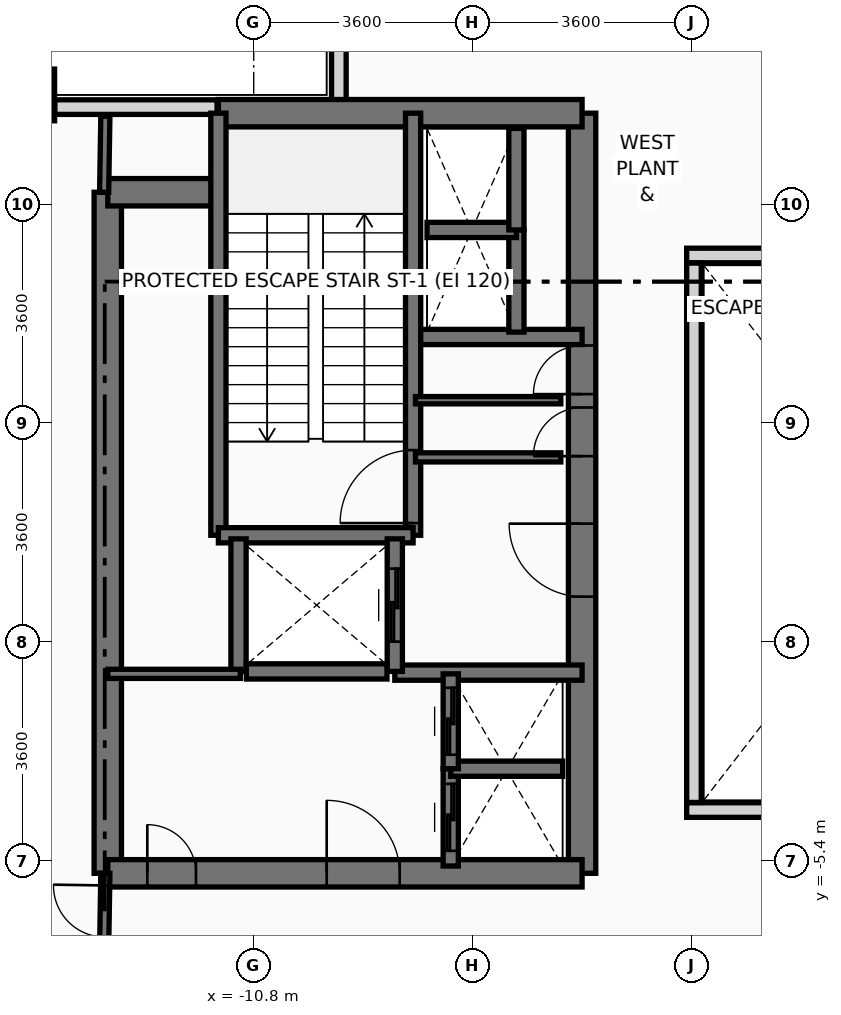
"""IFC4 building model, lengths in metres.
Left out: names, types, materials, properties, quantities, classifications, styles, units other than length and angle.
Written with IfcOpenShell. Run it as: python <this file> out.ifc"""

import sys

from ifc_helpers import new_model, si_unit, direction, frame, frame_2d, origin, origin_2d, place, context, subcontext, project, spatial, rectangle, extrude, source, transform, mapped, element, fill, save


model = new_model("IFC4")
c1 = context("Model", 3, precision=1e-05, world=origin(), true_north=direction((0.0, 1.0)))
c2 = subcontext(c1, "Body", "Model", "MODEL_VIEW")
j1 = project(units=[si_unit("LENGTHUNIT", "METRE"), si_unit("PLANEANGLEUNIT", "RADIAN")], contexts=[c1])
p1 = place(None, origin())
s1 = spatial("IfcSite", under=j1, at=p1, CompositionType="ELEMENT")
p2 = place(p1, origin())
s2 = spatial("IfcBuilding", under=s1, at=p2, CompositionType="ELEMENT")
p3 = place(p2, frame((0.0, 0.0, 151.6)))
s3 = spatial("IfcBuildingStorey", under=s2, at=p3, CompositionType="ELEMENT", Elevation=151.6)
m1 = source(origin(), c2, "Body", "SweptSolid", [
    extrude(rectangle(XDim=0.65, YDim=0.85, at=origin_2d()), origin(), (0.0, 0.0, 1.0), 4.4),
])
p4 = place(p3, frame((-14.4, 7.2, 0.0), z_axis=(0.0, 0.0, 1.0), x_axis=(1.0, 0.0, 0.0)))
e1 = element("IfcColumn", 1, at=p4, inside=s3, PredefinedType="COLUMN", context=c2, shape_type="MappedRepresentation", body=[
    mapped(m1, transform((0.0, 0.0, 0.0), x_axis=(1.0, 0.0, 0.0), y_axis=(0.0, 1.0, 0.0), z_axis=(0.0, 0.0, 1.0), scale=1.0)),
])
p5 = place(p3, frame((-14.072, 7.0, 0.0), z_axis=(0.0, 0.0, 1.0), x_axis=(1.0, 0.0, 0.0)))
e2 = element("IfcWall", 2, at=p5, inside=s3, PredefinedType="PARAPET", context=c2, shape_type="SweptSolid", body=[
    extrude(rectangle(XDim=2.669, YDim=0.24, at=frame_2d((1.334, 0.0))), origin(), (0.0, 0.0, 1.0), 1.15),
])
p6 = place(p3, frame((-9.4, 6.953, 0.0), z_axis=(0.0, 0.0, 1.0), x_axis=(0.0, 1.0, 0.0)))
e3 = element("IfcWall", 3, at=p6, inside=s3, PredefinedType="PARAPET", context=c2, shape_type="SweptSolid", body=[
    extrude(rectangle(XDim=1.519, YDim=0.24, at=frame_2d((0.76, 0.0))), origin(), (0.0, 0.0, 1.0), 1.15),
])
p7 = place(p3, frame((-13.2, -5.6, 0.0), z_axis=(0.0, 0.0, 1.0), x_axis=(0.0, 1.0, 0.0)))
e4 = element("IfcWall", 4, at=p7, inside=s3, PredefinedType="SHEAR", context=c2, shape_type="SweptSolid", body=[
    extrude(rectangle(XDim=11.2, YDim=0.45, at=frame_2d((5.6, 0.0))), origin(), (0.0, 0.0, 1.0), 4.4),
])
p8 = place(p3, frame((-5.4, -5.6, 0.0), z_axis=(0.0, 0.0, 1.0), x_axis=(0.0, 1.0, 0.0)))
e5 = element("IfcWall", 5, at=p8, inside=s3, PredefinedType="SHEAR", context=c2, shape_type="SweptSolid", body=[
    extrude(rectangle(XDim=12.5, YDim=0.45, at=frame_2d((6.25, 0.0))), origin(), (0.0, 0.0, 1.0), 4.4),
])
p9 = place(p8, frame((4.55, 0.0, 0.0)))
e6 = element("IfcOpeningElement", 6, at=p9, cuts=e5, PredefinedType="OPENING", context=c2, shape_type="SweptSolid", body=[
    extrude(rectangle(XDim=1.2, YDim=2.2, at=frame_2d((0.6, 1.1))), frame((0.0, 0.235, 0.0), z_axis=(0.0, -1.0, 0.0), x_axis=(1.0, 0.0, 0.0)), (0.0, 0.0, 1.0), 0.47),
])
p10 = place(p8, frame((6.86, 0.0, 0.0)))
e7 = element("IfcOpeningElement", 7, at=p10, cuts=e5, PredefinedType="OPENING", context=c2, shape_type="SweptSolid", body=[
    extrude(rectangle(XDim=0.8, YDim=2.1, at=frame_2d((0.4, 1.05))), frame((0.0, 0.235, 0.0), z_axis=(0.0, -1.0, 0.0), x_axis=(1.0, 0.0, 0.0)), (0.0, 0.0, 1.0), 0.47),
])
p11 = place(p8, frame((7.88, 0.0, 0.0)))
e8 = element("IfcOpeningElement", 8, at=p11, cuts=e5, PredefinedType="OPENING", context=c2, shape_type="SweptSolid", body=[
    extrude(rectangle(XDim=0.8, YDim=2.1, at=frame_2d((0.4, 1.05))), frame((0.0, 0.235, 0.0), z_axis=(0.0, -1.0, 0.0), x_axis=(1.0, 0.0, 0.0)), (0.0, 0.0, 1.0), 0.47),
])
p12 = place(p3, frame((-11.381, 6.9, 0.0), z_axis=(0.0, 0.0, 1.0), x_axis=(1.0, 0.0, 0.0)))
e9 = element("IfcWall", 9, at=p12, inside=s3, PredefinedType="SHEAR", context=c2, shape_type="SweptSolid", body=[
    extrude(rectangle(XDim=5.981, YDim=0.45, at=frame_2d((2.991, 0.0))), origin(), (0.0, 0.0, 1.0), 4.4),
])
p13 = place(p3, frame((-13.2, 5.6, 0.0), z_axis=(0.0, 0.0, 1.0), x_axis=(1.0, 0.0, 0.0)))
e10 = element("IfcWall", 10, at=p13, inside=s3, PredefinedType="SHEAR", context=c2, shape_type="SweptSolid", body=[
    extrude(rectangle(XDim=1.819, YDim=0.45, at=frame_2d((0.909, 0.0))), origin(), (0.0, 0.0, 1.0), 4.4),
])
p14 = place(p3, frame((-13.2, -5.6, 0.0), z_axis=(0.0, 0.0, 1.0), x_axis=(1.0, 0.0, 0.0)))
e11 = element("IfcWall", 11, at=p14, inside=s3, PredefinedType="SHEAR", context=c2, shape_type="SweptSolid", body=[
    extrude(rectangle(XDim=7.8, YDim=0.45, at=frame_2d((3.9, 0.0))), origin(), (0.0, 0.0, 1.0), 4.4),
])
p15 = place(p14, frame((3.6, 0.0, 0.0)))
e12 = element("IfcOpeningElement", 12, at=p15, cuts=e11, PredefinedType="OPENING", context=c2, shape_type="SweptSolid", body=[
    extrude(rectangle(XDim=1.2, YDim=2.2, at=frame_2d((0.6, 1.1))), frame((0.0, 0.235, 0.0), z_axis=(0.0, -1.0, 0.0), x_axis=(1.0, 0.0, 0.0)), (0.0, 0.0, 1.0), 0.47),
])
p16 = place(p14, frame((0.65, 0.0, 0.0)))
e13 = element("IfcOpeningElement", 13, at=p16, cuts=e11, PredefinedType="OPENING", context=c2, shape_type="SweptSolid", body=[
    extrude(rectangle(XDim=0.8, YDim=2.1, at=frame_2d((0.4, 1.05))), frame((0.0, 0.235, 0.0), z_axis=(0.0, -1.0, 0.0), x_axis=(1.0, 0.0, 0.0)), (0.0, 0.0, 1.0), 0.47),
])
p17 = place(p3, frame((-8.18, 3.22, 0.0), z_axis=(0.0, 0.0, 1.0), x_axis=(1.0, 0.0, 0.0)))
e14 = element("IfcWall", 14, at=p17, inside=s3, PredefinedType="SOLIDWALL", context=c2, shape_type="SweptSolid", body=[
    extrude(rectangle(XDim=2.78, YDim=0.25, at=frame_2d((1.39, 0.0))), origin(), (0.0, 0.0, 1.0), 4.4),
])
p18 = place(p3, frame((-8.48, -2.3, 0.0), z_axis=(0.0, 0.0, 1.0), x_axis=(1.0, 0.0, 0.0)))
e15 = element("IfcWall", 15, at=p18, inside=s3, PredefinedType="SOLIDWALL", context=c2, shape_type="SweptSolid", body=[
    extrude(rectangle(XDim=3.08, YDim=0.25, at=frame_2d((1.54, 0.0))), origin(), (0.0, 0.0, 1.0), 4.4),
])
p19 = place(p3, frame((-8.179, -0.041, 0.0), z_axis=(0.0, 0.0, 1.0), x_axis=(0.0, 1.0, 0.0)))
e16 = element("IfcWall", 16, at=p19, inside=s3, PredefinedType="SOLIDWALL", context=c2, shape_type="SweptSolid", body=[
    extrude(rectangle(XDim=6.941, YDim=0.25, at=frame_2d((3.47, 0.0))), origin(), (0.0, 0.0, 1.0), 4.4),
])
p20 = place(p19, frame((0.2, 0.0, 0.0)))
e17 = element("IfcOpeningElement", 17, at=p20, cuts=e16, PredefinedType="OPENING", context=c2, shape_type="SweptSolid", body=[
    extrude(rectangle(XDim=1.2, YDim=2.2, at=frame_2d((0.6, 1.1))), frame((0.0, 0.135, 0.0), z_axis=(0.0, -1.0, 0.0), x_axis=(1.0, 0.0, 0.0)), (0.0, 0.0, 1.0), 0.27),
])
p21 = place(p3, frame((-11.381, -0.041, 0.0), z_axis=(0.0, 0.0, 1.0), x_axis=(0.0, 1.0, 0.0)))
e18 = element("IfcWall", 18, at=p21, inside=s3, PredefinedType="SOLIDWALL", context=c2, shape_type="SweptSolid", body=[
    extrude(rectangle(XDim=6.941, YDim=0.25, at=frame_2d((3.47, 0.0))), origin(), (0.0, 0.0, 1.0), 4.4),
])
p22 = place(p3, frame((-11.381, -0.041, 0.0), z_axis=(0.0, 0.0, 1.0), x_axis=(1.0, 0.0, 0.0)))
e19 = element("IfcWall", 19, at=p22, inside=s3, PredefinedType="SOLIDWALL", context=c2, shape_type="SweptSolid", body=[
    extrude(rectangle(XDim=3.202, YDim=0.25, at=frame_2d((1.601, 0.0))), origin(), (0.0, 0.0, 1.0), 4.4),
])
p23 = place(p3, frame((-11.05, -2.28, 0.0), z_axis=(0.0, 0.0, 1.0), x_axis=(0.0, 1.0, 0.0)))
e20 = element("IfcWall", 20, at=p23, inside=s3, PredefinedType="SOLIDWALL", context=c2, shape_type="SweptSolid", body=[
    extrude(rectangle(XDim=2.18, YDim=0.25, at=frame_2d((1.09, 0.0))), origin(), (0.0, 0.0, 1.0), 4.4),
])
p24 = place(p3, frame((-8.48, -2.28, 0.0), z_axis=(0.0, 0.0, 1.0), x_axis=(0.0, 1.0, 0.0)))
e21 = element("IfcWall", 21, at=p24, inside=s3, PredefinedType="SOLIDWALL", context=c2, shape_type="SweptSolid", body=[
    extrude(rectangle(XDim=2.18, YDim=0.25, at=frame_2d((1.09, 0.0))), origin(), (0.0, 0.0, 1.0), 4.4),
])
p25 = place(p24, frame((0.49, 0.0, 0.0)))
e22 = element("IfcOpeningElement", 22, at=p25, cuts=e21, PredefinedType="OPENING", context=c2, shape_type="SweptSolid", body=[
    extrude(rectangle(XDim=1.2, YDim=2.2, at=frame_2d((0.6, 1.1))), frame((0.0, 0.135, 0.0), z_axis=(0.0, -1.0, 0.0), x_axis=(1.0, 0.0, 0.0)), (0.0, 0.0, 1.0), 0.27),
])
p26 = place(p3, frame((-10.921, -2.28, 0.0), z_axis=(0.0, 0.0, 1.0), x_axis=(1.0, 0.0, 0.0)))
e23 = element("IfcWall", 23, at=p26, inside=s3, PredefinedType="SOLIDWALL", context=c2, shape_type="SweptSolid", body=[
    extrude(rectangle(XDim=2.312, YDim=0.25, at=frame_2d((1.156, 0.0))), origin(), (0.0, 0.0, 1.0), 4.4),
])
p27 = place(p3, frame((-7.56, -5.48, 0.0), z_axis=(0.0, 0.0, 1.0), x_axis=(0.0, 1.0, 0.0)))
e24 = element("IfcWall", 24, at=p27, inside=s3, PredefinedType="SOLIDWALL", context=c2, shape_type="SweptSolid", body=[
    extrude(rectangle(XDim=1.6, YDim=0.25, at=frame_2d((0.8, 0.0))), origin(), (0.0, 0.0, 1.0), 4.4),
])
p28 = place(p27, frame((0.25, 0.0, 0.0)))
e25 = element("IfcOpeningElement", 25, at=p28, cuts=e24, PredefinedType="OPENING", context=c2, shape_type="SweptSolid", body=[
    extrude(rectangle(XDim=1.1, YDim=2.2, at=frame_2d((0.55, 1.1))), frame((0.0, 0.135, 0.0), z_axis=(0.0, -1.0, 0.0), x_axis=(1.0, 0.0, 0.0)), (0.0, 0.0, 1.0), 0.27),
])
p29 = place(p3, frame((-7.56, -3.88, 0.0), z_axis=(0.0, 0.0, 1.0), x_axis=(1.0, 0.0, 0.0)))
e26 = element("IfcWall", 26, at=p29, inside=s3, PredefinedType="SOLIDWALL", context=c2, shape_type="SweptSolid", body=[
    extrude(rectangle(XDim=1.84, YDim=0.25, at=frame_2d((0.92, 0.0))), origin(), (0.0, 0.0, 1.0), 4.4),
])
p30 = place(p3, frame((-7.56, -3.88, 0.0), z_axis=(0.0, 0.0, 1.0), x_axis=(0.0, 1.0, 0.0)))
e27 = element("IfcWall", 27, at=p30, inside=s3, PredefinedType="SOLIDWALL", context=c2, shape_type="SweptSolid", body=[
    extrude(rectangle(XDim=1.56, YDim=0.25, at=frame_2d((0.78, 0.0))), origin(), (0.0, 0.0, 1.0), 4.4),
])
p31 = place(p30, frame((0.23, 0.0, 0.0)))
e28 = element("IfcOpeningElement", 28, at=p31, cuts=e27, PredefinedType="OPENING", context=c2, shape_type="SweptSolid", body=[
    extrude(rectangle(XDim=1.1, YDim=2.2, at=frame_2d((0.55, 1.1))), frame((0.0, 0.135, 0.0), z_axis=(0.0, -1.0, 0.0), x_axis=(1.0, 0.0, 0.0)), (0.0, 0.0, 1.0), 0.27),
])
p32 = place(p3, frame((-6.48, 3.3, 0.0), z_axis=(0.0, 0.0, 1.0), x_axis=(0.0, 1.0, 0.0)))
e29 = element("IfcWall", 29, at=p32, inside=s3, PredefinedType="SOLIDWALL", context=c2, shape_type="SweptSolid", body=[
    extrude(rectangle(XDim=1.68, YDim=0.25, at=frame_2d((0.84, 0.0))), origin(), (0.0, 0.0, 1.0), 4.4),
])
p33 = place(p3, frame((-7.95, 4.98, 0.0), z_axis=(0.0, 0.0, 1.0), x_axis=(1.0, 0.0, 0.0)))
e30 = element("IfcWall", 30, at=p33, inside=s3, PredefinedType="SOLIDWALL", context=c2, shape_type="SweptSolid", body=[
    extrude(rectangle(XDim=1.47, YDim=0.25, at=frame_2d((0.735, 0.0))), origin(), (0.0, 0.0, 1.0), 4.4),
])
p34 = place(p3, frame((-6.48, 4.98, 0.0), z_axis=(0.0, 0.0, 1.0), x_axis=(0.0, 1.0, 0.0)))
e31 = element("IfcWall", 31, at=p34, inside=s3, PredefinedType="SOLIDWALL", context=c2, shape_type="SweptSolid", body=[
    extrude(rectangle(XDim=1.67, YDim=0.25, at=frame_2d((0.835, 0.0))), origin(), (0.0, 0.0, 1.0), 4.4),
])
p35 = place(p3, frame((-8.14, 1.24, 0.0), z_axis=(0.0, 0.0, 1.0), x_axis=(1.0, 0.0, 0.0)))
e32 = element("IfcWall", 32, at=p35, inside=s3, PredefinedType="PARTITIONING", context=c2, shape_type="SweptSolid", body=[
    extrude(rectangle(XDim=2.39, YDim=0.15, at=frame_2d((1.195, 0.0))), origin(), (0.0, 0.0, 1.0), 3.5),
])
p36 = place(p3, frame((-8.14, 2.18, 0.0), z_axis=(0.0, 0.0, 1.0), x_axis=(1.0, 0.0, 0.0)))
e33 = element("IfcWall", 33, at=p36, inside=s3, PredefinedType="PARTITIONING", context=c2, shape_type="SweptSolid", body=[
    extrude(rectangle(XDim=2.39, YDim=0.12, at=frame_2d((1.195, 0.0))), origin(), (0.0, 0.0, 1.0), 3.5),
])
p37 = place(p3, frame((-13.2, -2.32, 0.0), z_axis=(0.0, 0.0, 1.0), x_axis=(1.0, 0.0, 0.0)))
e34 = element("IfcWall", 34, at=p37, inside=s3, PredefinedType="PARTITIONING", context=c2, shape_type="SweptSolid", body=[
    extrude(rectangle(XDim=2.18, YDim=0.15, at=frame_2d((1.09, 0.0))), origin(), (0.0, 0.0, 1.0), 4.4),
])
p38 = place(p3, frame((-13.26, -6.85, 0.0), z_axis=(0.0, 0.0, 1.0), x_axis=(0.016013571389, 0.999871774545, 0.0)))
e35 = element("IfcWall", 35, at=p38, inside=s3, PredefinedType="PARTITIONING", context=c2, shape_type="SweptSolid", body=[
    extrude(rectangle(XDim=1.25, YDim=0.15, at=frame_2d((0.625, 0.0))), origin(), (0.0, 0.0, 1.0), 4.4),
])
p39 = place(p38, frame((0.2, 0.0, 0.0)))
e36 = element("IfcOpeningElement", 36, at=p39, cuts=e35, PredefinedType="OPENING", context=c2, shape_type="SweptSolid", body=[
    extrude(rectangle(XDim=0.85, YDim=2.1, at=frame_2d((0.425, 1.05))), frame((0.0, 0.085, 0.0), z_axis=(0.0, -1.0, 0.0), x_axis=(1.0, 0.0, 0.0)), (0.0, 0.0, 1.0), 0.17),
])
p40 = place(p3, frame((-13.26, 5.6, 0.0), z_axis=(0.0, 0.0, 1.0), x_axis=(0.016013571389, 0.999871774545, 0.0)))
e37 = element("IfcWall", 37, at=p40, inside=s3, PredefinedType="PARTITIONING", context=c2, shape_type="SweptSolid", body=[
    extrude(rectangle(XDim=1.25, YDim=0.15, at=frame_2d((0.625, 0.0))), origin(), (0.0, 0.0, 1.0), 4.4),
])
for number, where, z_axis, x_axis in (
    (38, (-3.68, -4.56, 0.0), (0.0, 0.0, 1.0), (1.0, 0.0, 0.0)),
    (39, (-3.68, 4.56, 0.0), (0.0, 0.0, 1.0), (1.0, 0.0, 0.0)),
):
    element("IfcWall", number, at=place(p3, frame(where, z_axis=z_axis, x_axis=x_axis)), inside=s3, PredefinedType="PARAPET", context=c2, shape_type="SweptSolid", body=[
        extrude(rectangle(XDim=7.36, YDim=0.24, at=frame_2d((3.68, 0.0))), origin(), (0.0, 0.0, 1.0), 1.15),
    ])
p41 = place(p3, frame((-3.56, -4.435, 0.0), z_axis=(0.0, 0.0, 1.0), x_axis=(0.0, 1.0, 0.0)))
e40 = element("IfcWall", 40, at=p41, inside=s3, PredefinedType="PARAPET", context=c2, shape_type="SweptSolid", body=[
    extrude(rectangle(XDim=8.87, YDim=0.24, at=frame_2d((4.435, 0.0))), origin(), (0.0, 0.0, 1.0), 1.15),
])
m2 = source(origin(), c2, "Body", "SweptSolid", [
    extrude(rectangle(XDim=1.2, YDim=2.2, at=frame_2d((0.6, 1.1))), frame((0.0, 0.025, 0.0), z_axis=(0.0, -1.0, 0.0), x_axis=(1.0, 0.0, 0.0)), (0.0, 0.0, 1.0), 0.05),
])
p42 = place(p20, origin())
e41 = element("IfcDoor", 41, at=p42, inside=s3, OperationType="SINGLE_SWING_LEFT", PredefinedType="DOOR", context=c2, shape_type="MappedRepresentation", body=[
    mapped(m2, transform((0.0, 0.0, 0.0), x_axis=(1.0, 0.0, 0.0), y_axis=(0.0, 1.0, 0.0), z_axis=(0.0, 0.0, 1.0), scale=1.0)),
])
fill(e17, e41)
p43 = place(p9, origin())
e42 = element("IfcDoor", 42, at=p43, inside=s3, OperationType="SINGLE_SWING_RIGHT", PredefinedType="DOOR", context=c2, shape_type="MappedRepresentation", body=[
    mapped(m2, transform((0.0, 0.0, 0.0), x_axis=(1.0, 0.0, 0.0), y_axis=(0.0, 1.0, 0.0), z_axis=(0.0, 0.0, 1.0), scale=1.0)),
])
fill(e6, e42)
p44 = place(p15, origin())
e43 = element("IfcDoor", 43, at=p44, inside=s3, OperationType="SINGLE_SWING_LEFT", PredefinedType="DOOR", context=c2, shape_type="MappedRepresentation", body=[
    mapped(m2, transform((0.0, 0.0, 0.0), x_axis=(1.0, 0.0, 0.0), y_axis=(0.0, 1.0, 0.0), z_axis=(0.0, 0.0, 1.0), scale=1.0)),
])
fill(e12, e43)
m3 = source(origin(), c2, "Body", "SweptSolid", [
    extrude(rectangle(XDim=0.8, YDim=2.1, at=frame_2d((0.4, 1.05))), frame((0.0, 0.025, 0.0), z_axis=(0.0, -1.0, 0.0), x_axis=(1.0, 0.0, 0.0)), (0.0, 0.0, 1.0), 0.05),
])
p45 = place(p10, origin())
e44 = element("IfcDoor", 44, at=p45, inside=s3, OperationType="SINGLE_SWING_LEFT", PredefinedType="DOOR", context=c2, shape_type="MappedRepresentation", body=[
    mapped(m3, transform((0.0, 0.0, 0.0), x_axis=(1.0, 0.0, 0.0), y_axis=(0.0, 1.0, 0.0), z_axis=(0.0, 0.0, 1.0), scale=1.0)),
])
fill(e7, e44)
p46 = place(p11, origin())
e45 = element("IfcDoor", 45, at=p46, inside=s3, OperationType="SINGLE_SWING_LEFT", PredefinedType="DOOR", context=c2, shape_type="MappedRepresentation", body=[
    mapped(m3, transform((0.0, 0.0, 0.0), x_axis=(1.0, 0.0, 0.0), y_axis=(0.0, 1.0, 0.0), z_axis=(0.0, 0.0, 1.0), scale=1.0)),
])
fill(e8, e45)
p47 = place(p16, origin())
e46 = element("IfcDoor", 46, at=p47, inside=s3, OperationType="SINGLE_SWING_LEFT", PredefinedType="DOOR", context=c2, shape_type="MappedRepresentation", body=[
    mapped(m3, transform((0.0, 0.0, 0.0), x_axis=(1.0, 0.0, 0.0), y_axis=(0.0, 1.0, 0.0), z_axis=(0.0, 0.0, 1.0), scale=1.0)),
])
fill(e13, e46)
p48 = place(p25, origin())
e47 = element("IfcDoor", 47, at=p48, inside=s3, OperationType="SLIDING_TO_RIGHT", PredefinedType="DOOR", context=c2, shape_type="MappedRepresentation", body=[
    mapped(m2, transform((0.0, 0.0, 0.0), x_axis=(1.0, 0.0, 0.0), y_axis=(0.0, 1.0, 0.0), z_axis=(0.0, 0.0, 1.0), scale=1.0)),
])
fill(e22, e47)
m4 = source(origin(), c2, "Body", "SweptSolid", [
    extrude(rectangle(XDim=1.1, YDim=2.2, at=frame_2d((0.55, 1.1))), frame((0.0, 0.025, 0.0), z_axis=(0.0, -1.0, 0.0), x_axis=(1.0, 0.0, 0.0)), (0.0, 0.0, 1.0), 0.05),
])
p49 = place(p28, origin())
e48 = element("IfcDoor", 48, at=p49, inside=s3, OperationType="SLIDING_TO_LEFT", PredefinedType="DOOR", context=c2, shape_type="MappedRepresentation", body=[
    mapped(m4, transform((0.0, 0.0, 0.0), x_axis=(1.0, 0.0, 0.0), y_axis=(0.0, 1.0, 0.0), z_axis=(0.0, 0.0, 1.0), scale=1.0)),
])
fill(e25, e48)
p50 = place(p31, origin())
e49 = element("IfcDoor", 49, at=p50, inside=s3, OperationType="SLIDING_TO_LEFT", PredefinedType="DOOR", context=c2, shape_type="MappedRepresentation", body=[
    mapped(m4, transform((0.0, 0.0, 0.0), x_axis=(1.0, 0.0, 0.0), y_axis=(0.0, 1.0, 0.0), z_axis=(0.0, 0.0, 1.0), scale=1.0)),
])
fill(e28, e49)
m5 = source(origin(), c2, "Body", "SweptSolid", [
    extrude(rectangle(XDim=0.85, YDim=2.1, at=frame_2d((0.425, 1.05))), frame((0.0, 0.025, 0.0), z_axis=(0.0, -1.0, 0.0), x_axis=(1.0, 0.0, 0.0)), (0.0, 0.0, 1.0), 0.05),
])
p51 = place(p39, origin())
e50 = element("IfcDoor", 50, at=p51, inside=s3, OperationType="SINGLE_SWING_RIGHT", PredefinedType="DOOR", context=c2, shape_type="MappedRepresentation", body=[
    mapped(m5, transform((0.0, 0.0, 0.0), x_axis=(1.0, 0.0, 0.0), y_axis=(0.0, 1.0, 0.0), z_axis=(0.0, 0.0, 1.0), scale=1.0)),
])
fill(e36, e50)
save(model, sys.argv[1])
